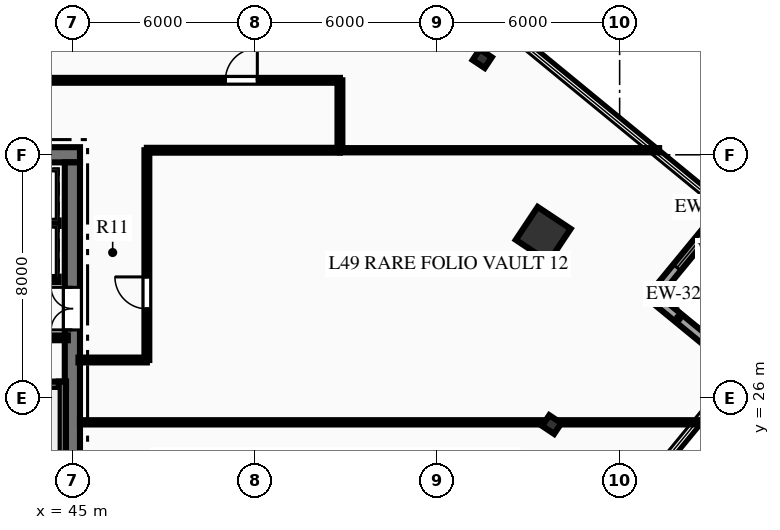
"""IFC4 building model, lengths in metres.
Left out: names, types, materials, properties, quantities, classifications, styles, units other than length and angle.
Written with IfcOpenShell. Run it as: python <this file> out.ifc"""

import sys

from ifc_helpers import new_model, si_unit, direction, frame, frame_2d, origin, origin_2d, place, context, subcontext, project, spatial, rectangle, hollow_rectangle, i_section, extrude, element, fill, save


model = new_model("IFC4")
c1 = context("Model", 3, precision=1e-05, world=origin(), true_north=direction((0.0, 1.0)))
c2 = subcontext(c1, "Body", "Model", "MODEL_VIEW")
j1 = project(units=[si_unit("LENGTHUNIT", "METRE"), si_unit("PLANEANGLEUNIT", "RADIAN")], contexts=[c1])
p1 = place(None, origin())
s1 = spatial("IfcSite", under=j1, at=p1, CompositionType="ELEMENT")
p2 = place(p1, origin())
s2 = spatial("IfcBuilding", under=s1, at=p2, CompositionType="ELEMENT")
p3 = place(p2, frame((0.0, 0.0, 198.45)))
s3 = spatial("IfcBuildingStorey", under=s2, at=p3, CompositionType="ELEMENT", Elevation=198.45)
p4 = place(p3, frame((26.75, 34.0, 0.0), z_axis=(0.0, 0.0, 1.0), x_axis=(1.0, 0.0, 0.0)))
e1 = element("IfcWall", 1, at=p4, inside=s3, PredefinedType="SHEAR", context=c2, shape_type="SweptSolid", body=[
    extrude(rectangle(XDim=18.5, YDim=0.5, at=frame_2d((9.25, 0.0))), origin(), (0.0, 0.0, 1.0), 3.75),
])
p5 = place(p4, frame((13.935, 0.0, 0.0)))
e2 = element("IfcOpeningElement", 2, at=p5, cuts=e1, PredefinedType="OPENING", context=c2, shape_type="SweptSolid", body=[
    extrude(rectangle(XDim=1.1, YDim=2.15, at=frame_2d((0.55, 1.075))), frame((0.0, 0.26, 0.0), z_axis=(0.0, -1.0, 0.0), x_axis=(1.0, 0.0, 0.0)), (0.0, 0.0, 1.0), 0.52),
])
p6 = place(p4, frame((16.185, 0.0, 0.0)))
e3 = element("IfcOpeningElement", 3, at=p6, cuts=e1, PredefinedType="OPENING", context=c2, shape_type="SweptSolid", body=[
    extrude(rectangle(XDim=1.1, YDim=2.15, at=frame_2d((0.55, 1.075))), frame((0.0, 0.26, 0.0), z_axis=(0.0, -1.0, 0.0), x_axis=(1.0, 0.0, 0.0)), (0.0, 0.0, 1.0), 0.52),
])
p7 = place(p3, frame((45.0, 18.25, 0.0), z_axis=(0.0, 0.0, 1.0), x_axis=(0.0, 1.0, 0.0)))
e4 = element("IfcWall", 4, at=p7, inside=s3, PredefinedType="SHEAR", context=c2, shape_type="SweptSolid", body=[
    extrude(rectangle(XDim=15.5, YDim=0.5, at=frame_2d((7.75, 0.0))), origin(), (0.0, 0.0, 1.0), 3.75),
])
p8 = place(p7, frame((9.99, 0.0, 0.0)))
e5 = element("IfcOpeningElement", 5, at=p8, cuts=e4, PredefinedType="OPENING", context=c2, shape_type="SweptSolid", body=[
    extrude(rectangle(XDim=1.4, YDim=2.2, at=frame_2d((0.7, 1.1))), frame((0.0, 0.26, 0.0), z_axis=(0.0, -1.0, 0.0), x_axis=(1.0, 0.0, 0.0)), (0.0, 0.0, 1.0), 0.52),
])
p9 = place(p3, frame((40.81, 26.42, 0.0), z_axis=(0.0, 0.0, 1.0), x_axis=(1.0, 0.0, 0.0)))
e6 = element("IfcWall", 6, at=p9, inside=s3, PredefinedType="SHEAR", context=c2, shape_type="SweptSolid", body=[
    extrude(rectangle(XDim=3.98, YDim=0.24, at=frame_2d((1.99, 0.0))), origin(), (0.0, 0.0, 1.0), 3.75),
])
p10 = place(p3, frame((44.67, 18.28, 0.0), z_axis=(0.0, 0.0, 1.0), x_axis=(0.0, 1.0, 0.0)))
e7 = element("IfcWall", 7, at=p10, inside=s3, PredefinedType="SHEAR", context=c2, shape_type="SweptSolid", body=[
    extrude(rectangle(XDim=8.26, YDim=0.24, at=frame_2d((4.13, 0.0))), origin(), (0.0, 0.0, 1.0), 3.75),
])
p11 = place(p3, frame((60.486, 31.384, 0.0), z_axis=(0.0, 0.0, 1.0), x_axis=(0.554118199338, 0.832437998389, 0.0)))
e8 = element("IfcColumn", 8, at=p11, inside=s3, PredefinedType="COLUMN", context=c2, shape_type="SweptSolid", body=[
    extrude(hollow_rectangle(XDim=1.3, YDim=1.3, WallThickness=0.06, at=origin_2d()), origin(), (0.0, 0.0, 1.0), 3.75),
])
for number, where, z_axis, x_axis in (
    (9, (60.766, 25.126, 0.0), (0.0, 0.0, 1.0), (0.554, 0.832, 0.0)),
    (10, (58.481, 37.164, 0.0), (0.0, 0.0, 1.0), (0.554, 0.832, 0.0)),
):
    element("IfcColumn", number, at=place(p3, frame(where, z_axis=z_axis, x_axis=x_axis)), inside=s3, PredefinedType="COLUMN", context=c2, shape_type="SweptSolid", body=[
        extrude(i_section(OverallWidth=0.424, OverallDepth=0.474, WebThickness=0.048, FlangeThickness=0.077, at=origin_2d()), origin(), (0.0, 0.0, 1.0), 3.75),
    ])
p12 = place(p3, frame((64.094, 29.323, 0.0), z_axis=(0.0, 0.0, 1.0), x_axis=(0.77274818591, -0.634712723343, 0.0)))
e11 = element("IfcWall", 11, at=p12, inside=s3, PredefinedType="STANDARD", context=c2, shape_type="SweptSolid", body=[
    extrude(rectangle(XDim=3.9, YDim=0.32, at=frame_2d((1.95, 0.0))), origin(), (0.0, 0.0, 1.0), 3.47),
])
p13 = place(p3, frame((66.57, 32.337, 0.0), z_axis=(0.0, 0.0, 1.0), x_axis=(-0.63475010273, -0.772717482062, 0.0)))
e12 = element("IfcWall", 12, at=p13, inside=s3, PredefinedType="STANDARD", context=c2, shape_type="SweptSolid", body=[
    extrude(rectangle(XDim=3.9, YDim=0.32, at=frame_2d((1.95, 0.0))), origin(), (0.0, 0.0, 1.0), 3.47),
])
p14 = place(p13, frame((1.25, 0.0, 0.85)))
e13 = element("IfcOpeningElement", 13, at=p14, cuts=e12, PredefinedType="OPENING", context=c2, shape_type="SweptSolid", body=[
    extrude(rectangle(XDim=1.4, YDim=2.0, at=frame_2d((0.7, 1.0))), frame((0.0, 0.17, 0.0), z_axis=(0.0, -1.0, 0.0), x_axis=(1.0, 0.0, 0.0)), (0.0, 0.0, 1.0), 0.34),
])
p15 = place(p3, frame((40.8, 27.98, 0.0), z_axis=(0.0, 0.0, 1.0), x_axis=(1.0, 0.0, 0.0)))
e14 = element("IfcWall", 14, at=p15, inside=s3, PredefinedType="PARTITIONING", context=c2, shape_type="SweptSolid", body=[
    extrude(rectangle(XDim=4.05, YDim=0.16, at=frame_2d((2.025, 0.0))), origin(), (0.0, 0.0, 1.0), 3.47),
])
p16 = place(p15, frame((0.407, 0.0, 0.0)))
e15 = element("IfcOpeningElement", 15, at=p16, cuts=e14, PredefinedType="OPENING", context=c2, shape_type="SweptSolid", body=[
    extrude(rectangle(XDim=0.9, YDim=2.15, at=frame_2d((0.45, 1.075))), frame((0.0, 0.09, 0.0), z_axis=(0.0, -1.0, 0.0), x_axis=(1.0, 0.0, 0.0)), (0.0, 0.0, 1.0), 0.18),
])
p17 = place(p15, frame((2.2, 0.0, 0.0)))
e16 = element("IfcOpeningElement", 16, at=p17, cuts=e14, PredefinedType="OPENING", context=c2, shape_type="SweptSolid", body=[
    extrude(rectangle(XDim=0.9, YDim=2.15, at=frame_2d((0.45, 1.075))), frame((0.0, 0.09, 0.0), z_axis=(0.0, -1.0, 0.0), x_axis=(1.0, 0.0, 0.0)), (0.0, 0.0, 1.0), 0.18),
])
p18 = place(p3, frame((40.12, 29.9, 0.0), z_axis=(0.0, 0.0, 1.0), x_axis=(1.0, 0.0, 0.0)))
e17 = element("IfcWall", 17, at=p18, inside=s3, PredefinedType="PARTITIONING", context=c2, shape_type="SweptSolid", body=[
    extrude(rectangle(XDim=4.43, YDim=0.18, at=frame_2d((2.215, 0.0))), origin(), (0.0, 0.0, 1.0), 3.47),
])
p19 = place(p18, frame((0.565, 0.0, 0.0)))
e18 = element("IfcOpeningElement", 18, at=p19, cuts=e17, PredefinedType="OPENING", context=c2, shape_type="SweptSolid", body=[
    extrude(rectangle(XDim=1.1, YDim=2.15, at=frame_2d((0.55, 1.075))), frame((0.0, 0.1, 0.0), z_axis=(0.0, -1.0, 0.0), x_axis=(1.0, 0.0, 0.0)), (0.0, 0.0, 1.0), 0.2),
])
p20 = place(p18, frame((2.815, 0.0, 0.0)))
e19 = element("IfcOpeningElement", 19, at=p20, cuts=e17, PredefinedType="OPENING", context=c2, shape_type="SweptSolid", body=[
    extrude(rectangle(XDim=1.1, YDim=2.15, at=frame_2d((0.55, 1.075))), frame((0.0, 0.1, 0.0), z_axis=(0.0, -1.0, 0.0), x_axis=(1.0, 0.0, 0.0)), (0.0, 0.0, 1.0), 0.2),
])
p21 = place(p3, frame((40.12, 31.75, 0.0), z_axis=(0.0, 0.0, 1.0), x_axis=(1.0, 0.0, 0.0)))
e20 = element("IfcWall", 20, at=p21, inside=s3, PredefinedType="PARTITIONING", context=c2, shape_type="SweptSolid", body=[
    extrude(rectangle(XDim=4.43, YDim=0.18, at=frame_2d((2.215, 0.0))), origin(), (0.0, 0.0, 1.0), 3.47),
])
p22 = place(p3, frame((18.2, 36.45, 0.0), z_axis=(0.0, 0.0, 1.0), x_axis=(1.0, 0.0, 0.0)))
e21 = element("IfcWall", 21, at=p22, inside=s3, PredefinedType="PARTITIONING", context=c2, shape_type="SweptSolid", body=[
    extrude(rectangle(XDim=35.6, YDim=0.16, at=frame_2d((17.8, 0.0))), origin(), (0.0, 0.0, 1.0), 2.849),
])
p23 = place(p22, frame((7.55, 0.0, 0.0)))
e22 = element("IfcOpeningElement", 22, at=p23, cuts=e21, PredefinedType="OPENING", context=c2, shape_type="SweptSolid", body=[
    extrude(rectangle(XDim=0.9, YDim=2.15, at=frame_2d((0.45, 1.075))), frame((0.0, 0.09, 0.0), z_axis=(0.0, -1.0, 0.0), x_axis=(1.0, 0.0, 0.0)), (0.0, 0.0, 1.0), 0.18),
])
p24 = place(p22, frame((9.85, 0.0, 0.0)))
e23 = element("IfcOpeningElement", 23, at=p24, cuts=e21, PredefinedType="OPENING", context=c2, shape_type="SweptSolid", body=[
    extrude(rectangle(XDim=0.9, YDim=2.15, at=frame_2d((0.45, 1.075))), frame((0.0, 0.09, 0.0), z_axis=(0.0, -1.0, 0.0), x_axis=(1.0, 0.0, 0.0)), (0.0, 0.0, 1.0), 0.18),
])
p25 = place(p22, frame((12.1, 0.0, 0.0)))
e24 = element("IfcOpeningElement", 24, at=p25, cuts=e21, PredefinedType="OPENING", context=c2, shape_type="SweptSolid", body=[
    extrude(rectangle(XDim=1.0, YDim=2.15, at=frame_2d((0.5, 1.075))), frame((0.0, 0.09, 0.0), z_axis=(0.0, -1.0, 0.0), x_axis=(1.0, 0.0, 0.0)), (0.0, 0.0, 1.0), 0.18),
])
p26 = place(p22, frame((4.345, 0.0, 0.0)))
e25 = element("IfcOpeningElement", 25, at=p26, cuts=e21, PredefinedType="OPENING", context=c2, shape_type="SweptSolid", body=[
    extrude(rectangle(XDim=1.05, YDim=2.15, at=frame_2d((0.525, 1.075))), frame((0.0, 0.09, 0.0), z_axis=(0.0, -1.0, 0.0), x_axis=(1.0, 0.0, 0.0)), (0.0, 0.0, 1.0), 0.18),
])
p27 = place(p22, frame((18.049, 0.0, 0.0)))
e26 = element("IfcOpeningElement", 26, at=p27, cuts=e21, PredefinedType="OPENING", context=c2, shape_type="SweptSolid", body=[
    extrude(rectangle(XDim=1.05, YDim=2.15, at=frame_2d((0.525, 1.075))), frame((0.0, 0.09, 0.0), z_axis=(0.0, -1.0, 0.0), x_axis=(1.0, 0.0, 0.0)), (0.0, 0.0, 1.0), 0.18),
])
p28 = place(p22, frame((31.833, 0.0, 0.0)))
e27 = element("IfcOpeningElement", 27, at=p28, cuts=e21, PredefinedType="OPENING", context=c2, shape_type="SweptSolid", body=[
    extrude(rectangle(XDim=1.05, YDim=2.15, at=frame_2d((0.525, 1.075))), frame((0.0, 0.09, 0.0), z_axis=(0.0, -1.0, 0.0), x_axis=(1.0, 0.0, 0.0)), (0.0, 0.0, 1.0), 0.18),
])
p29 = place(p3, frame((47.45, 34.15, 0.0), z_axis=(0.0, 0.0, 1.0), x_axis=(1.0, 0.0, 0.0)))
e28 = element("IfcWall", 28, at=p29, inside=s3, PredefinedType="PARTITIONING", context=c2, shape_type="SweptSolid", body=[
    extrude(rectangle(XDim=6.35, YDim=0.16, at=frame_2d((3.175, 0.0))), origin(), (0.0, 0.0, 1.0), 3.47),
])
p30 = place(p3, frame((47.45, 27.25, 0.0), z_axis=(0.0, 0.0, 1.0), x_axis=(0.0, 1.0, 0.0)))
e29 = element("IfcWall", 29, at=p30, inside=s3, PredefinedType="PARTITIONING", context=c2, shape_type="SweptSolid", body=[
    extrude(rectangle(XDim=6.9, YDim=0.16, at=frame_2d((3.45, 0.0))), origin(), (0.0, 0.0, 1.0), 3.47),
])
p31 = place(p30, frame((1.683, 0.0, 0.0)))
e30 = element("IfcOpeningElement", 30, at=p31, cuts=e29, PredefinedType="OPENING", context=c2, shape_type="SweptSolid", body=[
    extrude(rectangle(XDim=1.05, YDim=2.15, at=frame_2d((0.525, 1.075))), frame((0.0, 0.09, 0.0), z_axis=(0.0, -1.0, 0.0), x_axis=(1.0, 0.0, 0.0)), (0.0, 0.0, 1.0), 0.18),
])
p32 = place(p3, frame((45.2, 27.25, 0.0), z_axis=(0.0, 0.0, 1.0), x_axis=(1.0, 0.0, 0.0)))
e31 = element("IfcWall", 31, at=p32, inside=s3, PredefinedType="PARTITIONING", context=c2, shape_type="SweptSolid", body=[
    extrude(rectangle(XDim=2.25, YDim=0.16, at=frame_2d((1.125, 0.0))), origin(), (0.0, 0.0, 1.0), 3.47),
])
p33 = place(p3, frame((53.8, 34.15, 0.0), z_axis=(0.0, 0.0, 1.0), x_axis=(0.0, 1.0, 0.0)))
e32 = element("IfcWall", 32, at=p33, inside=s3, PredefinedType="PARTITIONING", context=c2, shape_type="SweptSolid", body=[
    extrude(rectangle(XDim=2.3, YDim=0.16, at=frame_2d((1.15, 0.0))), origin(), (0.0, 0.0, 1.0), 3.47),
])
p34 = place(p3, frame((53.8, 34.15, 0.0), z_axis=(0.0, 0.0, 1.0), x_axis=(1.0, 0.0, 0.0)))
e33 = element("IfcWall", 33, at=p34, inside=s3, PredefinedType="PARTITIONING", context=c2, shape_type="SweptSolid", body=[
    extrude(rectangle(XDim=10.499, YDim=0.14, at=frame_2d((5.25, 0.0))), origin(), (0.0, 0.0, 1.0), 3.47),
])
p35 = place(p3, frame((45.25, 25.2, 0.0), z_axis=(0.0, 0.0, 1.0), x_axis=(1.0, 0.0, 0.0)))
e34 = element("IfcWall", 34, at=p35, inside=s3, PredefinedType="PARTITIONING", context=c2, shape_type="SweptSolid", body=[
    extrude(rectangle(XDim=20.453, YDim=0.14, at=frame_2d((10.226, 0.0))), origin(), (0.0, 0.0, 1.0), 3.008),
])
p36 = place(p14, origin())
e35 = element("IfcWindow", 35, at=p36, inside=s3, PartitioningType="SINGLE_PANEL", PredefinedType="WINDOW", context=c2, shape_type="SweptSolid", body=[
    extrude(rectangle(XDim=1.4, YDim=2.0, at=frame_2d((0.7, 1.0))), frame((0.0, 0.03, 0.0), z_axis=(0.0, -1.0, 0.0), x_axis=(1.0, 0.0, 0.0)), (0.0, 0.0, 1.0), 0.06),
])
fill(e13, e35)
p37 = place(p8, origin())
e36 = element("IfcDoor", 36, at=p37, inside=s3, OperationType="DOUBLE_DOOR_SINGLE_SWING", PredefinedType="DOOR", context=c2, shape_type="SweptSolid", body=[
    extrude(rectangle(XDim=1.4, YDim=2.2, at=frame_2d((0.7, 1.1))), frame((0.0, 0.025, 0.0), z_axis=(0.0, -1.0, 0.0), x_axis=(1.0, 0.0, 0.0)), (0.0, 0.0, 1.0), 0.05),
])
fill(e5, e36)
p38 = place(p28, origin())
e37 = element("IfcDoor", 37, at=p38, inside=s3, OperationType="SINGLE_SWING_RIGHT", PredefinedType="DOOR", context=c2, shape_type="SweptSolid", body=[
    extrude(rectangle(XDim=1.05, YDim=2.15, at=frame_2d((0.525, 1.075))), frame((0.0, 0.025, 0.0), z_axis=(0.0, -1.0, 0.0), x_axis=(1.0, 0.0, 0.0)), (0.0, 0.0, 1.0), 0.05),
])
fill(e27, e37)
p39 = place(p31, origin())
e38 = element("IfcDoor", 38, at=p39, inside=s3, OperationType="SINGLE_SWING_RIGHT", PredefinedType="DOOR", context=c2, shape_type="SweptSolid", body=[
    extrude(rectangle(XDim=1.05, YDim=2.15, at=frame_2d((0.525, 1.075))), frame((0.0, 0.025, 0.0), z_axis=(0.0, -1.0, 0.0), x_axis=(1.0, 0.0, 0.0)), (0.0, 0.0, 1.0), 0.05),
])
fill(e30, e38)
save(model, sys.argv[1])
